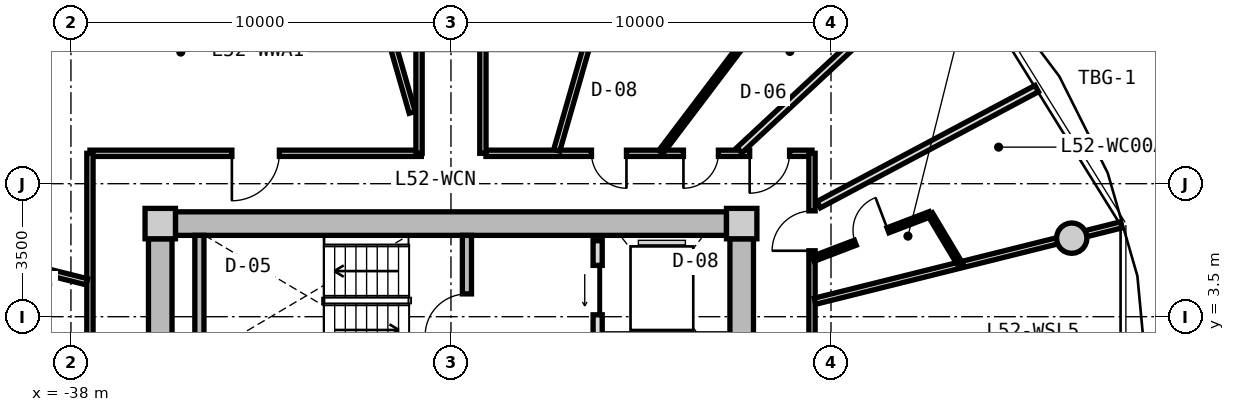
"""IFC4 building model, lengths in metres.
Left out: names, types, materials, properties, quantities, classifications, styles, units other than length and angle.
Written with IfcOpenShell. Run it as: python <this file> out.ifc"""

import sys

from ifc_helpers import new_model, si_unit, direction, frame, frame_2d, origin, origin_2d, place, context, subcontext, project, spatial, rectangle, circle, extrude, source, transform, mapped, element, fill, save


model = new_model("IFC4")
c1 = context("Model", 3, precision=1e-05, world=origin(), true_north=direction((0.0, 1.0)))
c2 = subcontext(c1, "Body", "Model", "MODEL_VIEW")
j1 = project(units=[si_unit("LENGTHUNIT", "METRE"), si_unit("PLANEANGLEUNIT", "RADIAN")], contexts=[c1])
p1 = place(None, origin())
s1 = spatial("IfcSite", under=j1, at=p1, CompositionType="ELEMENT")
p2 = place(p1, origin())
s2 = spatial("IfcBuilding", under=s1, at=p2, CompositionType="ELEMENT")
p3 = place(p2, frame((0.0, 0.0, 167.85)))
s3 = spatial("IfcBuildingStorey", under=s2, at=p3, CompositionType="ELEMENT", Elevation=167.85)
m1 = source(origin(), c2, "Body", "SweptSolid", [
    extrude(rectangle(XDim=0.8, YDim=0.8, at=origin_2d()), origin(), (0.0, 0.0, 1.0), 3.05),
])
for number, where, z_axis, x_axis in (
    (1, (-20.35, 5.95, 0.0), (0.0, 0.0, 1.0), (1.0, 0.0, 0.0)),
    (2, (-35.65, 5.95, 0.0), (0.0, 0.0, 1.0), (1.0, 0.0, 0.0)),
):
    element("IfcColumn", number, at=place(p3, frame(where, z_axis=z_axis, x_axis=x_axis)), inside=s3, PredefinedType="COLUMN", context=c2, shape_type="MappedRepresentation", body=[
        mapped(m1, transform((0.0, 0.0, 0.0), x_axis=(1.0, 0.0, 0.0), y_axis=(0.0, 1.0, 0.0), z_axis=(0.0, 0.0, 1.0), scale=1.0)),
    ])
m2 = source(origin(), c2, "Body", "SweptSolid", [
    extrude(rectangle(XDim=14.5, YDim=0.62, at=frame_2d((7.25, 0.0))), origin(), (0.0, 0.0, 1.0), 2.81),
])
p4 = place(p3, frame((-35.25, 5.95, 0.0), z_axis=(0.0, 0.0, 1.0), x_axis=(1.0, 0.0, 0.0)))
e3 = element("IfcWall", 3, at=p4, inside=s3, PredefinedType="SHEAR", context=c2, shape_type="MappedRepresentation", body=[
    mapped(m2, transform((0.0, 0.0, 0.0), x_axis=(1.0, 0.0, 0.0), y_axis=(0.0, 1.0, 0.0), z_axis=(0.0, 0.0, 1.0), scale=1.0)),
])
m3 = source(origin(), c2, "Body", "SweptSolid", [
    extrude(rectangle(XDim=11.1, YDim=0.62, at=frame_2d((5.55, 0.0))), origin(), (0.0, 0.0, 1.0), 2.81),
])
p5 = place(p3, frame((-35.65, -5.55, 0.0), z_axis=(0.0, 0.0, 1.0), x_axis=(0.0, 1.0, 0.0)))
e4 = element("IfcWall", 4, at=p5, inside=s3, PredefinedType="SHEAR", context=c2, shape_type="MappedRepresentation", body=[
    mapped(m3, transform((0.0, 0.0, 0.0), x_axis=(1.0, 0.0, 0.0), y_axis=(0.0, 1.0, 0.0), z_axis=(0.0, 0.0, 1.0), scale=1.0)),
])
p6 = place(p5, frame((3.8, 0.0, 0.0)))
e5 = element("IfcOpeningElement", 5, at=p6, cuts=e4, PredefinedType="OPENING", context=c2, shape_type="SweptSolid", body=[
    extrude(rectangle(XDim=1.2, YDim=2.15, at=frame_2d((0.6, 1.075))), frame((0.0, 0.32, 0.0), z_axis=(0.0, -1.0, 0.0), x_axis=(1.0, 0.0, 0.0)), (0.0, 0.0, 1.0), 0.64),
])
p7 = place(p3, frame((-20.35, 5.55, 0.0), z_axis=(0.0, 0.0, 1.0), x_axis=(0.0, -1.0, 0.0)))
e6 = element("IfcWall", 6, at=p7, inside=s3, PredefinedType="SHEAR", context=c2, shape_type="MappedRepresentation", body=[
    mapped(m3, transform((0.0, 0.0, 0.0), x_axis=(1.0, 0.0, 0.0), y_axis=(0.0, 1.0, 0.0), z_axis=(0.0, 0.0, 1.0), scale=1.0)),
])
p8 = place(p7, frame((5.65, 0.0, 0.0)))
e7 = element("IfcOpeningElement", 7, at=p8, cuts=e6, PredefinedType="OPENING", context=c2, shape_type="SweptSolid", body=[
    extrude(rectangle(XDim=1.2, YDim=2.15, at=frame_2d((0.6, 1.075))), frame((0.0, 0.32, 0.0), z_axis=(0.0, -1.0, 0.0), x_axis=(1.0, 0.0, 0.0)), (0.0, 0.0, 1.0), 0.64),
])
p9 = place(p7, frame((9.3, 0.0, 0.0)))
e8 = element("IfcOpeningElement", 8, at=p9, cuts=e6, PredefinedType="OPENING", context=c2, shape_type="SweptSolid", body=[
    extrude(rectangle(XDim=1.0, YDim=2.1, at=frame_2d((0.5, 1.05))), frame((0.0, 0.32, 0.0), z_axis=(0.0, -1.0, 0.0), x_axis=(1.0, 0.0, 0.0)), (0.0, 0.0, 1.0), 0.64),
])
m4 = source(origin(), c2, "Body", "SweptSolid", [
    extrude(circle(Radius=0.4, at=origin_2d()), origin(), (0.0, 0.0, 1.0), 3.05),
])
p10 = place(p3, frame((-11.665, 5.567, 0.0), z_axis=(0.0, 0.0, 1.0), x_axis=(1.0, 0.0, 0.0)))
e9 = element("IfcColumn", 9, at=p10, inside=s3, PredefinedType="COLUMN", context=c2, shape_type="MappedRepresentation", body=[
    mapped(m4, transform((0.0, 0.0, 0.0), x_axis=(1.0, 0.0, 0.0), y_axis=(0.0, 1.0, 0.0), z_axis=(0.0, 0.0, 1.0), scale=1.0)),
])
m5 = source(origin(), c2, "Body", "SweptSolid", [
    extrude(rectangle(XDim=3.19, YDim=0.24, at=frame_2d((1.595, 0.0))), origin(), (0.0, 0.0, 1.0), 2.81),
])
p11 = place(p3, frame((-34.62, 2.45, 0.0), z_axis=(0.0, 0.0, 1.0), x_axis=(0.0, 1.0, 0.0)))
e10 = element("IfcWall", 10, at=p11, inside=s3, PredefinedType="PARTITIONING", context=c2, shape_type="MappedRepresentation", body=[
    mapped(m5, transform((0.0, 0.0, 0.0), x_axis=(1.0, 0.0, 0.0), y_axis=(0.0, 1.0, 0.0), z_axis=(0.0, 0.0, 1.0), scale=1.0)),
])
p12 = place(p3, frame((-27.58, 2.45, 0.0), z_axis=(0.0, 0.0, 1.0), x_axis=(0.0, 1.0, 0.0)))
e11 = element("IfcWall", 11, at=p12, inside=s3, PredefinedType="PARTITIONING", context=c2, shape_type="MappedRepresentation", body=[
    mapped(m5, transform((0.0, 0.0, 0.0), x_axis=(1.0, 0.0, 0.0), y_axis=(0.0, 1.0, 0.0), z_axis=(0.0, 0.0, 1.0), scale=1.0)),
])
p13 = place(p12, frame((0.55, 0.0, 0.0)))
e12 = element("IfcOpeningElement", 12, at=p13, cuts=e11, PredefinedType="OPENING", context=c2, shape_type="SweptSolid", body=[
    extrude(rectangle(XDim=1.1, YDim=2.15, at=frame_2d((0.55, 1.075))), frame((0.0, 0.13, 0.0), z_axis=(0.0, -1.0, 0.0), x_axis=(1.0, 0.0, 0.0)), (0.0, 0.0, 1.0), 0.26),
])
m6 = source(origin(), c2, "Body", "SweptSolid", [
    extrude(rectangle(XDim=5.0, YDim=0.24, at=frame_2d((2.5, 0.0))), origin(), (0.0, 0.0, 1.0), 2.795),
])
p14 = place(p3, frame((-24.14, 0.5, 0.0), z_axis=(0.0, 0.0, 1.0), x_axis=(0.0, 1.0, 0.0)))
e13 = element("IfcWall", 13, at=p14, inside=s3, PredefinedType="PARTITIONING", context=c2, shape_type="MappedRepresentation", body=[
    mapped(m6, transform((0.0, 0.0, 0.0), x_axis=(1.0, 0.0, 0.0), y_axis=(0.0, 1.0, 0.0), z_axis=(0.0, 0.0, 1.0), scale=1.0)),
])
p15 = place(p14, frame((3.05, 0.0, 0.0)))
e14 = element("IfcOpeningElement", 14, at=p15, cuts=e13, PredefinedType="OPENING", context=c2, shape_type="SweptSolid", body=[
    extrude(rectangle(XDim=1.3, YDim=2.2, at=frame_2d((0.65, 1.1))), frame((0.0, 0.13, 0.0), z_axis=(0.0, -1.0, 0.0), x_axis=(1.0, 0.0, 0.0)), (0.0, 0.0, 1.0), 0.26),
])
p16 = place(p14, frame((0.55, 0.0, 0.0)))
e15 = element("IfcOpeningElement", 15, at=p16, cuts=e13, PredefinedType="OPENING", context=c2, shape_type="SweptSolid", body=[
    extrude(rectangle(XDim=1.3, YDim=2.2, at=frame_2d((0.65, 1.1))), frame((0.0, 0.13, 0.0), z_axis=(0.0, -1.0, 0.0), x_axis=(1.0, 0.0, 0.0)), (0.0, 0.0, 1.0), 0.26),
])
m7 = source(origin(), c2, "Body", "SweptSolid", [
    extrude(rectangle(XDim=8.719, YDim=0.165, at=frame_2d((4.36, 0.0))), origin(), (0.0, 0.0, 1.0), 2.795),
])
p17 = place(p3, frame((-37.5, 7.8, 0.0), z_axis=(0.0, 0.0, 1.0), x_axis=(1.0, 0.0, 0.0)))
e16 = element("IfcWall", 16, at=p17, inside=s3, PredefinedType="PARTITIONING", context=c2, shape_type="MappedRepresentation", body=[
    mapped(m7, transform((0.0, 0.0, 0.0), x_axis=(1.0, 0.0, 0.0), y_axis=(0.0, 1.0, 0.0), z_axis=(0.0, 0.0, 1.0), scale=1.0)),
])
p18 = place(p17, frame((3.735, 0.0, 0.0)))
e17 = element("IfcOpeningElement", 17, at=p18, cuts=e16, PredefinedType="OPENING", context=c2, shape_type="SweptSolid", body=[
    extrude(rectangle(XDim=1.25, YDim=2.2, at=frame_2d((0.625, 1.1))), frame((0.0, 0.093, 0.0), z_axis=(0.0, -1.0, 0.0), x_axis=(1.0, 0.0, 0.0)), (0.0, 0.0, 1.0), 0.185),
])
m8 = source(origin(), c2, "Body", "SweptSolid", [
    extrude(rectangle(XDim=8.58, YDim=0.165, at=frame_2d((4.29, 0.0))), origin(), (0.0, 0.0, 1.0), 2.795),
])
p19 = place(p3, frame((-27.08, 7.8, 0.0), z_axis=(0.0, 0.0, 1.0), x_axis=(1.0, 0.0, 0.0)))
e18 = element("IfcWall", 18, at=p19, inside=s3, PredefinedType="PARTITIONING", context=c2, shape_type="MappedRepresentation", body=[
    mapped(m8, transform((0.0, 0.0, 0.0), x_axis=(1.0, 0.0, 0.0), y_axis=(0.0, 1.0, 0.0), z_axis=(0.0, 0.0, 1.0), scale=1.0)),
])
p20 = place(p19, frame((6.94, 0.0, 0.0)))
e19 = element("IfcOpeningElement", 19, at=p20, cuts=e18, PredefinedType="OPENING", context=c2, shape_type="SweptSolid", body=[
    extrude(rectangle(XDim=1.05, YDim=2.15, at=frame_2d((0.525, 1.075))), frame((0.0, 0.093, 0.0), z_axis=(0.0, -1.0, 0.0), x_axis=(1.0, 0.0, 0.0)), (0.0, 0.0, 1.0), 0.185),
])
p21 = place(p19, frame((5.197, 0.0, 0.0)))
e20 = element("IfcOpeningElement", 20, at=p21, cuts=e18, PredefinedType="OPENING", context=c2, shape_type="SweptSolid", body=[
    extrude(rectangle(XDim=0.92, YDim=2.1, at=frame_2d((0.46, 1.05))), frame((0.0, 0.093, 0.0), z_axis=(0.0, -1.0, 0.0), x_axis=(1.0, 0.0, 0.0)), (0.0, 0.0, 1.0), 0.185),
])
p22 = place(p19, frame((2.778, 0.0, 0.0)))
e21 = element("IfcOpeningElement", 21, at=p22, cuts=e18, PredefinedType="OPENING", context=c2, shape_type="SweptSolid", body=[
    extrude(rectangle(XDim=0.92, YDim=2.1, at=frame_2d((0.46, 1.05))), frame((0.0, 0.093, 0.0), z_axis=(0.0, -1.0, 0.0), x_axis=(1.0, 0.0, 0.0)), (0.0, 0.0, 1.0), 0.185),
])
m9 = source(origin(), c2, "Body", "SweptSolid", [
    extrude(rectangle(XDim=6.88, YDim=0.165, at=frame_2d((3.44, 0.0))), origin(), (0.0, 0.0, 1.0), 2.795),
])
p23 = place(p3, frame((-37.5, 0.92, 0.0), z_axis=(0.0, 0.0, 1.0), x_axis=(0.0, 1.0, 0.0)))
e22 = element("IfcWall", 22, at=p23, inside=s3, PredefinedType="PARTITIONING", context=c2, shape_type="MappedRepresentation", body=[
    mapped(m9, transform((0.0, 0.0, 0.0), x_axis=(1.0, 0.0, 0.0), y_axis=(0.0, 1.0, 0.0), z_axis=(0.0, 0.0, 1.0), scale=1.0)),
])
p24 = place(p3, frame((-18.5, 7.8, 0.0), z_axis=(0.0, 0.0, 1.0), x_axis=(0.0, -1.0, 0.0)))
e23 = element("IfcWall", 23, at=p24, inside=s3, PredefinedType="PARTITIONING", context=c2, shape_type="MappedRepresentation", body=[
    mapped(m9, transform((0.0, 0.0, 0.0), x_axis=(1.0, 0.0, 0.0), y_axis=(0.0, 1.0, 0.0), z_axis=(0.0, 0.0, 1.0), scale=1.0)),
])
p25 = place(p24, frame((1.515, 0.0, 0.0)))
e24 = element("IfcOpeningElement", 24, at=p25, cuts=e23, PredefinedType="OPENING", context=c2, shape_type="SweptSolid", body=[
    extrude(rectangle(XDim=1.05, YDim=2.15, at=frame_2d((0.525, 1.075))), frame((0.0, 0.093, 0.0), z_axis=(0.0, -1.0, 0.0), x_axis=(1.0, 0.0, 0.0)), (0.0, 0.0, 1.0), 0.185),
])
m10 = source(origin(), c2, "Body", "SweptSolid", [
    extrude(rectangle(XDim=9.73, YDim=0.165, at=frame_2d((4.865, 0.0))), origin(), (0.0, 0.0, 1.0), 2.345),
])
p26 = place(p3, frame((-25.217, 7.88, 0.0), z_axis=(0.0, 0.0, 1.0), x_axis=(0.27679492614, 0.960929013436, 0.0)))
e25 = element("IfcWall", 25, at=p26, inside=s3, PredefinedType="PARTITIONING", context=c2, shape_type="MappedRepresentation", body=[
    mapped(m10, transform((0.0, 0.0, 0.0), x_axis=(1.0, 0.0, 0.0), y_axis=(0.0, 1.0, 0.0), z_axis=(0.0, 0.0, 1.0), scale=1.0)),
])
m11 = source(origin(), c2, "Body", "SweptSolid", [
    extrude(rectangle(XDim=8.695, YDim=0.165, at=frame_2d((4.348, 0.0))), origin(), (0.0, 0.0, 1.0), 2.345),
])
p27 = place(p3, frame((-29.02, 8.875, 0.0), z_axis=(0.0, 0.0, 1.0), x_axis=(-0.276797231892, 0.960928349263, 0.0)))
e26 = element("IfcWall", 26, at=p27, inside=s3, PredefinedType="PARTITIONING", context=c2, shape_type="MappedRepresentation", body=[
    mapped(m11, transform((0.0, 0.0, 0.0), x_axis=(1.0, 0.0, 0.0), y_axis=(0.0, 1.0, 0.0), z_axis=(0.0, 0.0, 1.0), scale=1.0)),
])
m12 = source(origin(), c2, "Body", "SweptSolid", [
    extrude(rectangle(XDim=6.193, YDim=0.165, at=frame_2d((3.096, 0.0))), origin(), (0.0, 0.0, 1.0), 2.345),
])
p28 = place(p3, frame((-37.58, 4.419, 0.0), z_axis=(0.0, 0.0, 1.0), x_axis=(-0.970309243466, 0.241867674657, 0.0)))
e27 = element("IfcWall", 27, at=p28, inside=s3, PredefinedType="PARTITIONING", context=c2, shape_type="MappedRepresentation", body=[
    mapped(m12, transform((0.0, 0.0, 0.0), x_axis=(1.0, 0.0, 0.0), y_axis=(0.0, 1.0, 0.0), z_axis=(0.0, 0.0, 1.0), scale=1.0)),
])
m13 = source(origin(), c2, "Body", "SweptSolid", [
    extrude(rectangle(XDim=8.305, YDim=0.165, at=frame_2d((4.153, 0.0))), origin(), (0.0, 0.0, 1.0), 2.345),
])
p29 = place(p3, frame((-18.42, 3.908, 0.0), z_axis=(0.0, 0.0, 1.0), x_axis=(0.970309994378, 0.241864662175, 0.0)))
e28 = element("IfcWall", 28, at=p29, inside=s3, PredefinedType="PARTITIONING", context=c2, shape_type="MappedRepresentation", body=[
    mapped(m13, transform((0.0, 0.0, 0.0), x_axis=(1.0, 0.0, 0.0), y_axis=(0.0, 1.0, 0.0), z_axis=(0.0, 0.0, 1.0), scale=1.0)),
])
m14 = source(origin(), c2, "Body", "SweptSolid", [
    extrude(rectangle(XDim=9.48, YDim=0.165, at=frame_2d((4.74, 0.0))), origin(), (0.0, 0.0, 1.0), 2.795),
])
p30 = place(p3, frame((-28.84, 7.8, 0.0), z_axis=(0.0, 0.0, 1.0), x_axis=(0.0, 1.0, 0.0)))
e29 = element("IfcWall", 29, at=p30, inside=s3, PredefinedType="PARTITIONING", context=c2, shape_type="MappedRepresentation", body=[
    mapped(m14, transform((0.0, 0.0, 0.0), x_axis=(1.0, 0.0, 0.0), y_axis=(0.0, 1.0, 0.0), z_axis=(0.0, 0.0, 1.0), scale=1.0)),
])
p31 = place(p30, frame((4.521, 0.0, 0.0)))
e30 = element("IfcOpeningElement", 30, at=p31, cuts=e29, PredefinedType="OPENING", context=c2, shape_type="SweptSolid", body=[
    extrude(rectangle(XDim=0.95, YDim=2.1, at=frame_2d((0.475, 1.05))), frame((0.0, 0.093, 0.0), z_axis=(0.0, -1.0, 0.0), x_axis=(1.0, 0.0, 0.0)), (0.0, 0.0, 1.0), 0.185),
])
p32 = place(p3, frame((-27.16, 17.28, 0.0), z_axis=(0.0, 0.0, 1.0), x_axis=(0.0, -1.0, 0.0)))
e31 = element("IfcWall", 31, at=p32, inside=s3, PredefinedType="PARTITIONING", context=c2, shape_type="MappedRepresentation", body=[
    mapped(m14, transform((0.0, 0.0, 0.0), x_axis=(1.0, 0.0, 0.0), y_axis=(0.0, 1.0, 0.0), z_axis=(0.0, 0.0, 1.0), scale=1.0)),
])
p33 = place(p32, frame((4.265, 0.0, 0.0)))
e32 = element("IfcOpeningElement", 32, at=p33, cuts=e31, PredefinedType="OPENING", context=c2, shape_type="SweptSolid", body=[
    extrude(rectangle(XDim=0.95, YDim=2.1, at=frame_2d((0.475, 1.05))), frame((0.0, 0.093, 0.0), z_axis=(0.0, -1.0, 0.0), x_axis=(1.0, 0.0, 0.0)), (0.0, 0.0, 1.0), 0.185),
])
m15 = source(origin(), c2, "Body", "SweptSolid", [
    extrude(rectangle(XDim=7.648, YDim=0.19, at=frame_2d((3.824, 0.0))), origin(), (0.0, 0.0, 1.0), 2.345),
])
p34 = place(p3, frame((-20.413, 7.88, 0.0), z_axis=(0.0, 0.0, 1.0), x_axis=(0.732182665826, 0.681108320213, 0.0)))
e33 = element("IfcWall", 33, at=p34, inside=s3, PredefinedType="PARTITIONING", context=c2, shape_type="MappedRepresentation", body=[
    mapped(m15, transform((0.0, 0.0, 0.0), x_axis=(1.0, 0.0, 0.0), y_axis=(0.0, 1.0, 0.0), z_axis=(0.0, 0.0, 1.0), scale=1.0)),
])
m16 = source(origin(), c2, "Body", "SweptSolid", [
    extrude(rectangle(XDim=6.499, YDim=0.19, at=frame_2d((3.25, 0.0))), origin(), (0.0, 0.0, 1.0), 2.795),
])
p35 = place(p3, frame((-18.324, 6.449, 0.0), z_axis=(0.0, 0.0, 1.0), x_axis=(0.882715595921, 0.469907625729, 0.0)))
e34 = element("IfcWall", 34, at=p35, inside=s3, PredefinedType="PARTITIONING", context=c2, shape_type="MappedRepresentation", body=[
    mapped(m16, transform((0.0, 0.0, 0.0), x_axis=(1.0, 0.0, 0.0), y_axis=(0.0, 1.0, 0.0), z_axis=(0.0, 0.0, 1.0), scale=1.0)),
])
m17 = source(origin(), c2, "Body", "SweptSolid", [
    extrude(rectangle(XDim=3.295, YDim=0.14, at=frame_2d((1.647, 0.0))), origin(), (0.0, 0.0, 1.0), 2.795),
])
p36 = place(p3, frame((-18.47, 5.023, 0.0), z_axis=(0.0, 0.0, 1.0), x_axis=(0.934202224769, 0.356743890258, 0.0)))
e35 = element("IfcWall", 35, at=p36, inside=s3, PredefinedType="PARTITIONING", context=c2, shape_type="MappedRepresentation", body=[
    mapped(m17, transform((0.0, 0.0, 0.0), x_axis=(1.0, 0.0, 0.0), y_axis=(0.0, 1.0, 0.0), z_axis=(0.0, 0.0, 1.0), scale=1.0)),
])
p37 = place(p36, frame((1.188, 0.0, 0.0)))
e36 = element("IfcOpeningElement", 36, at=p37, cuts=e35, PredefinedType="OPENING", context=c2, shape_type="SweptSolid", body=[
    extrude(rectangle(XDim=0.92, YDim=2.1, at=frame_2d((0.46, 1.05))), frame((0.0, 0.08, 0.0), z_axis=(0.0, -1.0, 0.0), x_axis=(1.0, 0.0, 0.0)), (0.0, 0.0, 1.0), 0.16),
])
m18 = source(origin(), c2, "Body", "SweptSolid", [
    extrude(rectangle(XDim=1.558, YDim=0.14, at=frame_2d((0.779, 0.0))), origin(), (0.0, 0.0, 1.0), 2.795),
])
p38 = place(p3, frame((-15.392, 6.198, 0.0), z_axis=(0.0, 0.0, 1.0), x_axis=(0.513735221728, -0.85794878749, 0.0)))
e37 = element("IfcWall", 37, at=p38, inside=s3, PredefinedType="PARTITIONING", context=c2, shape_type="MappedRepresentation", body=[
    mapped(m18, transform((0.0, 0.0, 0.0), x_axis=(1.0, 0.0, 0.0), y_axis=(0.0, 1.0, 0.0), z_axis=(0.0, 0.0, 1.0), scale=1.0)),
])
m19 = source(origin(), c2, "Body", "SweptSolid", [
    extrude(rectangle(XDim=8.359, YDim=0.14, at=frame_2d((4.18, 0.0))), origin(), (0.0, 0.0, 1.0), 2.795),
])
p39 = place(p3, frame((-22.477, 7.83, 0.0), z_axis=(0.0, 0.0, 1.0), x_axis=(0.603265985309, 0.797540062297, 0.0)))
e38 = element("IfcWall", 38, at=p39, inside=s3, PredefinedType="PARTITIONING", context=c2, shape_type="MappedRepresentation", body=[
    mapped(m19, transform((0.0, 0.0, 0.0), x_axis=(1.0, 0.0, 0.0), y_axis=(0.0, 1.0, 0.0), z_axis=(0.0, 0.0, 1.0), scale=1.0)),
])
m20 = source(origin(), c2, "Body", "SweptSolid", [
    extrude(rectangle(XDim=1.1, YDim=2.15, at=frame_2d((0.55, 1.075))), frame((0.0, 0.025, 0.0), z_axis=(0.0, -1.0, 0.0), x_axis=(1.0, 0.0, 0.0)), (0.0, 0.0, 1.0), 0.05),
])
p40 = place(p13, origin())
e39 = element("IfcDoor", 39, at=p40, inside=s3, OperationType="SINGLE_SWING_LEFT", PredefinedType="DOOR", context=c2, shape_type="MappedRepresentation", body=[
    mapped(m20, transform((0.0, 0.0, 0.0), x_axis=(1.0, 0.0, 0.0), y_axis=(0.0, 1.0, 0.0), z_axis=(0.0, 0.0, 1.0), scale=1.0)),
])
fill(e12, e39)
m21 = source(origin(), c2, "Body", "SweptSolid", [
    extrude(rectangle(XDim=1.3, YDim=2.2, at=frame_2d((0.65, 1.1))), frame((0.0, 0.025, 0.0), z_axis=(0.0, -1.0, 0.0), x_axis=(1.0, 0.0, 0.0)), (0.0, 0.0, 1.0), 0.05),
])
p41 = place(p15, origin())
e40 = element("IfcDoor", 40, at=p41, inside=s3, OperationType="SLIDING_TO_LEFT", PredefinedType="DOOR", context=c2, shape_type="MappedRepresentation", body=[
    mapped(m21, transform((0.0, 0.0, 0.0), x_axis=(1.0, 0.0, 0.0), y_axis=(0.0, 1.0, 0.0), z_axis=(0.0, 0.0, 1.0), scale=1.0)),
])
fill(e14, e40)
m22 = source(origin(), c2, "Body", "SweptSolid", [
    extrude(rectangle(XDim=1.05, YDim=2.15, at=frame_2d((0.525, 1.075))), frame((0.0, 0.025, 0.0), z_axis=(0.0, -1.0, 0.0), x_axis=(1.0, 0.0, 0.0)), (0.0, 0.0, 1.0), 0.05),
])
p42 = place(p25, frame((1.05, 0.0, 0.0), z_axis=(0.0, 0.0, 1.0), x_axis=(-1.0, 0.0, 0.0)))
e41 = element("IfcDoor", 41, at=p42, inside=s3, OperationType="SINGLE_SWING_LEFT", PredefinedType="DOOR", context=c2, shape_type="MappedRepresentation", body=[
    mapped(m22, transform((0.0, 0.0, 0.0), x_axis=(1.0, 0.0, 0.0), y_axis=(0.0, 1.0, 0.0), z_axis=(0.0, 0.0, 1.0), scale=1.0)),
])
fill(e24, e41)
m23 = source(origin(), c2, "Body", "SweptSolid", [
    extrude(rectangle(XDim=0.92, YDim=2.1, at=frame_2d((0.46, 1.05))), frame((0.0, 0.025, 0.0), z_axis=(0.0, -1.0, 0.0), x_axis=(1.0, 0.0, 0.0)), (0.0, 0.0, 1.0), 0.05),
])
p43 = place(p37, origin())
e42 = element("IfcDoor", 42, at=p43, inside=s3, OperationType="SINGLE_SWING_RIGHT", PredefinedType="DOOR", context=c2, shape_type="MappedRepresentation", body=[
    mapped(m23, transform((0.0, 0.0, 0.0), x_axis=(1.0, 0.0, 0.0), y_axis=(0.0, 1.0, 0.0), z_axis=(0.0, 0.0, 1.0), scale=1.0)),
])
fill(e36, e42)
p44 = place(p20, frame((1.05, 0.0, 0.0), z_axis=(0.0, 0.0, 1.0), x_axis=(-1.0, 0.0, 0.0)))
e43 = element("IfcDoor", 43, at=p44, inside=s3, OperationType="SINGLE_SWING_RIGHT", PredefinedType="DOOR", context=c2, shape_type="MappedRepresentation", body=[
    mapped(m22, transform((0.0, 0.0, 0.0), x_axis=(1.0, 0.0, 0.0), y_axis=(0.0, 1.0, 0.0), z_axis=(0.0, 0.0, 1.0), scale=1.0)),
])
fill(e19, e43)
p45 = place(p21, frame((0.92, 0.0, 0.0), z_axis=(0.0, 0.0, 1.0), x_axis=(-1.0, 0.0, 0.0)))
e44 = element("IfcDoor", 44, at=p45, inside=s3, OperationType="SINGLE_SWING_RIGHT", PredefinedType="DOOR", context=c2, shape_type="MappedRepresentation", body=[
    mapped(m23, transform((0.0, 0.0, 0.0), x_axis=(1.0, 0.0, 0.0), y_axis=(0.0, 1.0, 0.0), z_axis=(0.0, 0.0, 1.0), scale=1.0)),
])
fill(e20, e44)
p46 = place(p22, frame((0.92, 0.0, 0.0), z_axis=(0.0, 0.0, 1.0), x_axis=(-1.0, 0.0, 0.0)))
e45 = element("IfcDoor", 45, at=p46, inside=s3, OperationType="SINGLE_SWING_LEFT", PredefinedType="DOOR", context=c2, shape_type="MappedRepresentation", body=[
    mapped(m23, transform((0.0, 0.0, 0.0), x_axis=(1.0, 0.0, 0.0), y_axis=(0.0, 1.0, 0.0), z_axis=(0.0, 0.0, 1.0), scale=1.0)),
])
fill(e21, e45)
m24 = source(origin(), c2, "Body", "SweptSolid", [
    extrude(rectangle(XDim=1.25, YDim=2.2, at=frame_2d((0.625, 1.1))), frame((0.0, 0.025, 0.0), z_axis=(0.0, -1.0, 0.0), x_axis=(1.0, 0.0, 0.0)), (0.0, 0.0, 1.0), 0.05),
])
p47 = place(p18, frame((1.25, 0.0, 0.0), z_axis=(0.0, 0.0, 1.0), x_axis=(-1.0, 0.0, 0.0)))
e46 = element("IfcDoor", 46, at=p47, inside=s3, OperationType="SINGLE_SWING_RIGHT", PredefinedType="DOOR", context=c2, shape_type="MappedRepresentation", body=[
    mapped(m24, transform((0.0, 0.0, 0.0), x_axis=(1.0, 0.0, 0.0), y_axis=(0.0, 1.0, 0.0), z_axis=(0.0, 0.0, 1.0), scale=1.0)),
])
fill(e17, e46)
save(model, sys.argv[1])
